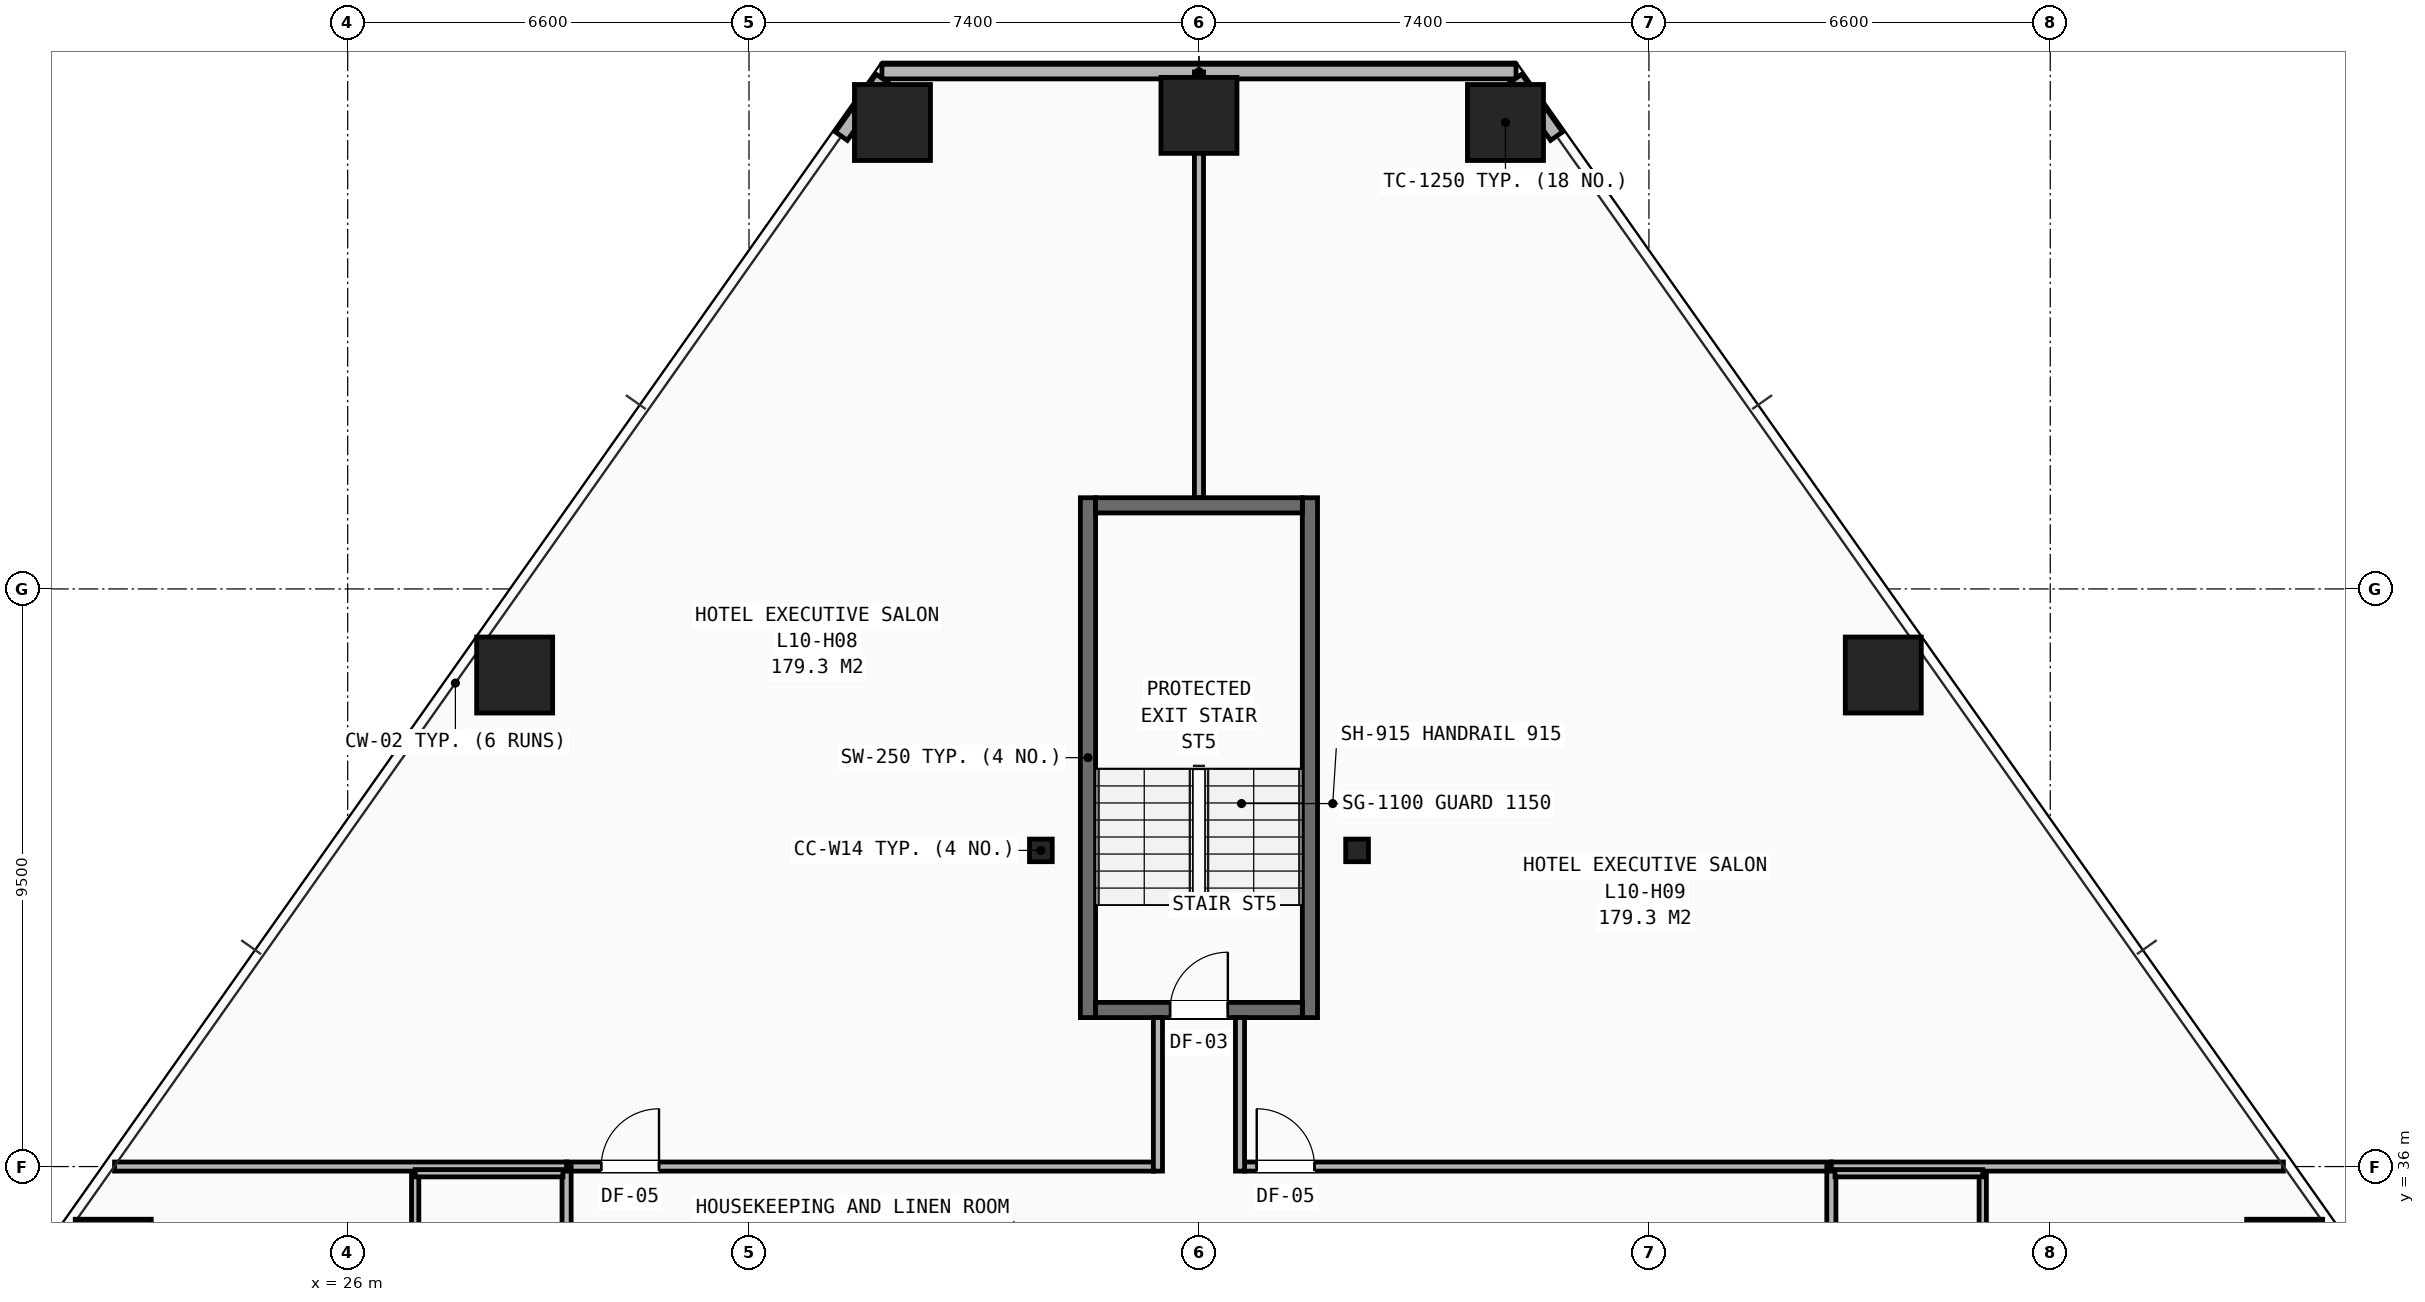
"""IFC4 building model, lengths in metres.
Left out: names, types, materials, properties, quantities, classifications, styles, units other than length and angle.
Written with IfcOpenShell. Run it as: python <this file> out.ifc"""

import sys

from ifc_helpers import new_model, si_unit, direction, frame, frame_2d, origin, origin_2d, place, context, subcontext, project, spatial, rectangle, hollow_rectangle, i_section, extrude, element, fill, save


model = new_model("IFC4")
c1 = context("Model", 3, precision=1e-05, world=origin(), true_north=direction((0.0, 1.0)))
c2 = subcontext(c1, "Body", "Model", "MODEL_VIEW")
j1 = project(units=[si_unit("LENGTHUNIT", "METRE"), si_unit("PLANEANGLEUNIT", "RADIAN")], contexts=[c1])
p1 = place(None, origin())
s1 = spatial("IfcSite", under=j1, at=p1, CompositionType="ELEMENT")
p2 = place(p1, origin())
s2 = spatial("IfcBuilding", under=s1, at=p2, CompositionType="ELEMENT")
p3 = place(p2, frame((0.0, 0.0, 40.0)))
s3 = spatial("IfcBuildingStorey", under=s2, at=p3, CompositionType="ELEMENT", Elevation=40.0)
for number, where, z_axis, x_axis in (
    (1, (37.4, 41.2, 0.0), (0.0, 0.0, 1.0), (1.0, 0.0, 0.0)),
    (2, (42.6, 41.2, 0.0), (0.0, 0.0, 1.0), (1.0, 0.0, 0.0)),
):
    element("IfcColumn", number, at=place(p3, frame(where, z_axis=z_axis, x_axis=x_axis)), inside=s3, PredefinedType="COLUMN", context=c2, shape_type="SweptSolid", body=[
        extrude(i_section(OverallWidth=0.374, OverallDepth=0.372, WebThickness=0.016, FlangeThickness=0.026, at=origin_2d()), origin(), (0.0, 0.0, 1.0), 3.2),
    ])
for number, where, z_axis, x_axis in (
    (3, (45.041, 53.172, 0.0), (0.0, 0.0, 1.0), (1.0, 0.0, 0.0)),
    (4, (40.0, 53.289, 0.0), (0.0, 0.0, 1.0), (1.0, 0.0, 0.0)),
    (5, (34.959, 53.172, 0.0), (0.0, 0.0, 1.0), (1.0, 0.0, 0.0)),
    (6, (28.746, 44.084, 0.0), (0.0, 0.0, 1.0), (1.0, 0.0, 0.0)),
    (7, (22.145, 34.509, 0.0), (0.0, 0.0, 1.0), (1.0, 0.0, 0.0)),
    (8, (57.855, 34.509, 0.0), (0.0, 0.0, 1.0), (1.0, 0.0, 0.0)),
    (9, (51.254, 44.084, 0.0), (0.0, 0.0, 1.0), (1.0, 0.0, 0.0)),
):
    element("IfcColumn", number, at=place(p3, frame(where, z_axis=z_axis, x_axis=x_axis)), inside=s3, PredefinedType="COLUMN", context=c2, shape_type="SweptSolid", body=[
        extrude(hollow_rectangle(XDim=1.25, YDim=1.25, WallThickness=0.08, at=origin_2d()), origin(), (0.0, 0.0, 1.0), 3.2),
    ])
p4 = place(p3, frame((34.786, 54.009, 0.0), z_axis=(0.0, 0.0, 1.0), x_axis=(1.0, 0.0, 0.0)))
e10 = element("IfcWall", 10, at=p4, inside=s3, PredefinedType="SHEAR", context=c2, shape_type="SweptSolid", body=[
    extrude(rectangle(XDim=10.429, YDim=0.24, at=frame_2d((5.214, 0.0))), origin(), (0.0, 0.0, 1.0), 2.263),
])
for number, where, z_axis, x_axis in (
    (11, (34.79, 53.896, 0.0), (0.0, 0.0, 1.0), (-0.577, -0.817, 0.0)),
    (12, (45.881, 52.947, 0.0), (0.0, 0.0, 1.0), (-0.577, 0.817, 0.0)),
):
    element("IfcWall", number, at=place(p3, frame(where, z_axis=z_axis, x_axis=x_axis)), inside=s3, PredefinedType="SHEAR", context=c2, shape_type="SweptSolid", body=[
        extrude(rectangle(XDim=1.162, YDim=0.24, at=frame_2d((0.581, 0.0))), origin(), (0.0, 0.0, 1.0), 2.263),
    ])
p5 = place(p3, frame((29.6, 36.0, 0.0), z_axis=(0.0, 0.0, 1.0), x_axis=(1.0, 0.0, 0.0)))
e13 = element("IfcWall", 13, at=p5, inside=s3, PredefinedType="PARTITIONING", context=c2, shape_type="SweptSolid", body=[
    extrude(rectangle(XDim=9.65, YDim=0.15, at=frame_2d((4.825, 0.0))), origin(), (0.0, 0.0, 1.0), 2.98),
])
p6 = place(p5, frame((0.57, 0.0, 0.0)))
e14 = element("IfcOpeningElement", 14, at=p6, cuts=e13, PredefinedType="OPENING", context=c2, shape_type="SweptSolid", body=[
    extrude(rectangle(XDim=0.95, YDim=2.1, at=frame_2d((0.475, 1.05))), frame((0.0, 0.085, 0.0), z_axis=(0.0, -1.0, 0.0), x_axis=(1.0, 0.0, 0.0)), (0.0, 0.0, 1.0), 0.17),
])
p7 = place(p3, frame((40.75, 36.0, 0.0), z_axis=(0.0, 0.0, 1.0), x_axis=(1.0, 0.0, 0.0)))
e15 = element("IfcWall", 15, at=p7, inside=s3, PredefinedType="PARTITIONING", context=c2, shape_type="SweptSolid", body=[
    extrude(rectangle(XDim=9.65, YDim=0.15, at=frame_2d((4.825, 0.0))), origin(), (0.0, 0.0, 1.0), 2.513),
])
p8 = place(p7, frame((0.2, 0.0, 0.0)))
e16 = element("IfcOpeningElement", 16, at=p8, cuts=e15, PredefinedType="OPENING", context=c2, shape_type="SweptSolid", body=[
    extrude(rectangle(XDim=0.95, YDim=2.1, at=frame_2d((0.475, 1.05))), frame((0.0, 0.085, 0.0), z_axis=(0.0, -1.0, 0.0), x_axis=(1.0, 0.0, 0.0)), (0.0, 0.0, 1.0), 0.17),
])
p9 = place(p3, frame((29.6, 14.1, 0.0), z_axis=(0.0, 0.0, 1.0), x_axis=(0.0, 1.0, 0.0)))
e17 = element("IfcWall", 17, at=p9, inside=s3, PredefinedType="PARTITIONING", context=c2, shape_type="SweptSolid", body=[
    extrude(rectangle(XDim=21.9, YDim=0.15, at=frame_2d((10.95, 0.0))), origin(), (0.0, 0.0, 1.0), 2.431),
])
p10 = place(p9, frame((0.42, 0.0, 0.0)))
e18 = element("IfcOpeningElement", 18, at=p10, cuts=e17, PredefinedType="OPENING", context=c2, shape_type="SweptSolid", body=[
    extrude(rectangle(XDim=0.95, YDim=2.1, at=frame_2d((0.475, 1.05))), frame((0.0, 0.085, 0.0), z_axis=(0.0, -1.0, 0.0), x_axis=(1.0, 0.0, 0.0)), (0.0, 0.0, 1.0), 0.17),
])
p11 = place(p9, frame((11.32, 0.0, 0.0)))
e19 = element("IfcOpeningElement", 19, at=p11, cuts=e17, PredefinedType="OPENING", context=c2, shape_type="SweptSolid", body=[
    extrude(rectangle(XDim=0.95, YDim=2.1, at=frame_2d((0.475, 1.05))), frame((0.0, 0.085, 0.0), z_axis=(0.0, -1.0, 0.0), x_axis=(1.0, 0.0, 0.0)), (0.0, 0.0, 1.0), 0.17),
])
p12 = place(p3, frame((50.4, 14.1, 0.0), z_axis=(0.0, 0.0, 1.0), x_axis=(0.0, 1.0, 0.0)))
e20 = element("IfcWall", 20, at=p12, inside=s3, PredefinedType="PARTITIONING", context=c2, shape_type="SweptSolid", body=[
    extrude(rectangle(XDim=21.9, YDim=0.15, at=frame_2d((10.95, 0.0))), origin(), (0.0, 0.0, 1.0), 2.431),
])
p13 = place(p12, frame((0.42, 0.0, 0.0)))
e21 = element("IfcOpeningElement", 21, at=p13, cuts=e20, PredefinedType="OPENING", context=c2, shape_type="SweptSolid", body=[
    extrude(rectangle(XDim=0.95, YDim=2.1, at=frame_2d((0.475, 1.05))), frame((0.0, 0.085, 0.0), z_axis=(0.0, -1.0, 0.0), x_axis=(1.0, 0.0, 0.0)), (0.0, 0.0, 1.0), 0.17),
])
p14 = place(p12, frame((7.32, 0.0, 0.0)))
e22 = element("IfcOpeningElement", 22, at=p14, cuts=e20, PredefinedType="OPENING", context=c2, shape_type="SweptSolid", body=[
    extrude(rectangle(XDim=0.95, YDim=2.1, at=frame_2d((0.475, 1.05))), frame((0.0, 0.085, 0.0), z_axis=(0.0, -1.0, 0.0), x_axis=(1.0, 0.0, 0.0)), (0.0, 0.0, 1.0), 0.17),
])
p15 = place(p12, frame((15.82, 0.0, 0.0)))
e23 = element("IfcOpeningElement", 23, at=p15, cuts=e20, PredefinedType="OPENING", context=c2, shape_type="SweptSolid", body=[
    extrude(rectangle(XDim=0.95, YDim=2.1, at=frame_2d((0.475, 1.05))), frame((0.0, 0.085, 0.0), z_axis=(0.0, -1.0, 0.0), x_axis=(1.0, 0.0, 0.0)), (0.0, 0.0, 1.0), 0.17),
])
p16 = place(p3, frame((22.166, 36.0, 0.0), z_axis=(0.0, 0.0, 1.0), x_axis=(1.0, 0.0, 0.0)))
e24 = element("IfcWall", 24, at=p16, inside=s3, PredefinedType="PARTITIONING", context=c2, shape_type="SweptSolid", body=[
    extrude(rectangle(XDim=7.434, YDim=0.15, at=frame_2d((3.717, 0.0))), origin(), (0.0, 0.0, 1.0), 2.268),
])
p17 = place(p3, frame((27.11, 33.61, 0.0), z_axis=(0.0, 0.0, 1.0), x_axis=(0.0, 1.0, 0.0)))
e25 = element("IfcWall", 25, at=p17, inside=s3, PredefinedType="PARTITIONING", context=c2, shape_type="SweptSolid", body=[
    extrude(rectangle(XDim=2.28, YDim=0.12, at=frame_2d((1.14, 0.0))), origin(), (0.0, 0.0, 1.0), 2.513),
])
p18 = place(p3, frame((27.11, 35.89, 0.0), z_axis=(0.0, 0.0, 1.0), x_axis=(1.0, 0.0, 0.0)))
e26 = element("IfcWall", 26, at=p18, inside=s3, PredefinedType="PARTITIONING", context=c2, shape_type="SweptSolid", body=[
    extrude(rectangle(XDim=2.43, YDim=0.12, at=frame_2d((1.215, 0.0))), origin(), (0.0, 0.0, 1.0), 2.513),
])
p19 = place(p3, frame((50.4, 36.0, 0.0), z_axis=(0.0, 0.0, 1.0), x_axis=(1.0, 0.0, 0.0)))
e27 = element("IfcWall", 27, at=p19, inside=s3, PredefinedType="PARTITIONING", context=c2, shape_type="SweptSolid", body=[
    extrude(rectangle(XDim=7.434, YDim=0.15, at=frame_2d((3.717, 0.0))), origin(), (0.0, 0.0, 1.0), 2.268),
])
p20 = place(p3, frame((52.89, 33.61, 0.0), z_axis=(0.0, 0.0, 1.0), x_axis=(0.0, 1.0, 0.0)))
e28 = element("IfcWall", 28, at=p20, inside=s3, PredefinedType="PARTITIONING", context=c2, shape_type="SweptSolid", body=[
    extrude(rectangle(XDim=2.28, YDim=0.12, at=frame_2d((1.14, 0.0))), origin(), (0.0, 0.0, 1.0), 2.98),
])
p21 = place(p3, frame((50.46, 35.89, 0.0), z_axis=(0.0, 0.0, 1.0), x_axis=(1.0, 0.0, 0.0)))
e29 = element("IfcWall", 29, at=p21, inside=s3, PredefinedType="PARTITIONING", context=c2, shape_type="SweptSolid", body=[
    extrude(rectangle(XDim=2.43, YDim=0.12, at=frame_2d((1.215, 0.0))), origin(), (0.0, 0.0, 1.0), 2.513),
])
p22 = place(p3, frame((40.0, 47.0, 0.0), z_axis=(0.0, 0.0, 1.0), x_axis=(0.0, 1.0, 0.0)))
e30 = element("IfcWall", 30, at=p22, inside=s3, PredefinedType="PARTITIONING", context=c2, shape_type="SweptSolid", body=[
    extrude(rectangle(XDim=7.004, YDim=0.15, at=frame_2d((3.502, 0.0))), origin(), (0.0, 0.0, 1.0), 2.268),
])
for number, where, z_axis, x_axis in (
    (31, (38.175, 38.45, 0.0), (0.0, 0.0, 1.0), (0.0, 1.0, 0.0)),
    (32, (41.825, 38.45, 0.0), (0.0, 0.0, 1.0), (0.0, 1.0, 0.0)),
):
    element("IfcWall", number, at=place(p3, frame(where, z_axis=z_axis, x_axis=x_axis)), inside=s3, PredefinedType="SHEAR", context=c2, shape_type="SweptSolid", body=[
        extrude(rectangle(XDim=8.55, YDim=0.25, at=frame_2d((4.275, 0.0))), origin(), (0.0, 0.0, 1.0), 2.98),
    ])
p23 = place(p3, frame((38.3, 38.575, 0.0), z_axis=(0.0, 0.0, 1.0), x_axis=(1.0, 0.0, 0.0)))
e33 = element("IfcWall", 33, at=p23, inside=s3, PredefinedType="SHEAR", context=c2, shape_type="SweptSolid", body=[
    extrude(rectangle(XDim=3.4, YDim=0.25, at=frame_2d((1.7, 0.0))), origin(), (0.0, 0.0, 1.0), 2.98),
])
p24 = place(p23, frame((1.225, 0.0, 0.0)))
e34 = element("IfcOpeningElement", 34, at=p24, cuts=e33, PredefinedType="OPENING", context=c2, shape_type="SweptSolid", body=[
    extrude(rectangle(XDim=0.95, YDim=2.1, at=frame_2d((0.475, 1.05))), frame((0.0, 0.135, 0.0), z_axis=(0.0, -1.0, 0.0), x_axis=(1.0, 0.0, 0.0)), (0.0, 0.0, 1.0), 0.27),
])
p25 = place(p3, frame((38.3, 46.875, 0.0), z_axis=(0.0, 0.0, 1.0), x_axis=(1.0, 0.0, 0.0)))
e35 = element("IfcWall", 35, at=p25, inside=s3, PredefinedType="SHEAR", context=c2, shape_type="SweptSolid", body=[
    extrude(rectangle(XDim=3.4, YDim=0.25, at=frame_2d((1.7, 0.0))), origin(), (0.0, 0.0, 1.0), 2.98),
])
for number, where, z_axis, x_axis in (
    (36, (39.325, 35.925, 0.0), (0.0, 0.0, 1.0), (0.0, 1.0, 0.0)),
    (37, (40.675, 35.925, 0.0), (0.0, 0.0, 1.0), (0.0, 1.0, 0.0)),
):
    element("IfcWall", number, at=place(p3, frame(where, z_axis=z_axis, x_axis=x_axis)), inside=s3, PredefinedType="PARTITIONING", context=c2, shape_type="SweptSolid", body=[
        extrude(rectangle(XDim=2.525, YDim=0.15, at=frame_2d((1.262, 0.0))), origin(), (0.0, 0.0, 1.0), 2.98),
    ])
p26 = place(p6, origin())
e38 = element("IfcDoor", 38, at=p26, inside=s3, OperationType="SINGLE_SWING_RIGHT", PredefinedType="DOOR", context=c2, shape_type="SweptSolid", body=[
    extrude(rectangle(XDim=0.95, YDim=2.1, at=frame_2d((0.475, 1.05))), frame((0.0, 0.025, 0.0), z_axis=(0.0, -1.0, 0.0), x_axis=(1.0, 0.0, 0.0)), (0.0, 0.0, 1.0), 0.05),
])
fill(e14, e38)
p27 = place(p8, origin())
e39 = element("IfcDoor", 39, at=p27, inside=s3, OperationType="SINGLE_SWING_LEFT", PredefinedType="DOOR", context=c2, shape_type="SweptSolid", body=[
    extrude(rectangle(XDim=0.95, YDim=2.1, at=frame_2d((0.475, 1.05))), frame((0.0, 0.025, 0.0), z_axis=(0.0, -1.0, 0.0), x_axis=(1.0, 0.0, 0.0)), (0.0, 0.0, 1.0), 0.05),
])
fill(e16, e39)
p28 = place(p24, origin())
e40 = element("IfcDoor", 40, at=p28, inside=s3, OperationType="SINGLE_SWING_RIGHT", PredefinedType="DOOR", context=c2, shape_type="SweptSolid", body=[
    extrude(rectangle(XDim=0.95, YDim=2.1, at=frame_2d((0.475, 1.05))), frame((0.0, 0.025, 0.0), z_axis=(0.0, -1.0, 0.0), x_axis=(1.0, 0.0, 0.0)), (0.0, 0.0, 1.0), 0.05),
])
fill(e34, e40)
save(model, sys.argv[1])
